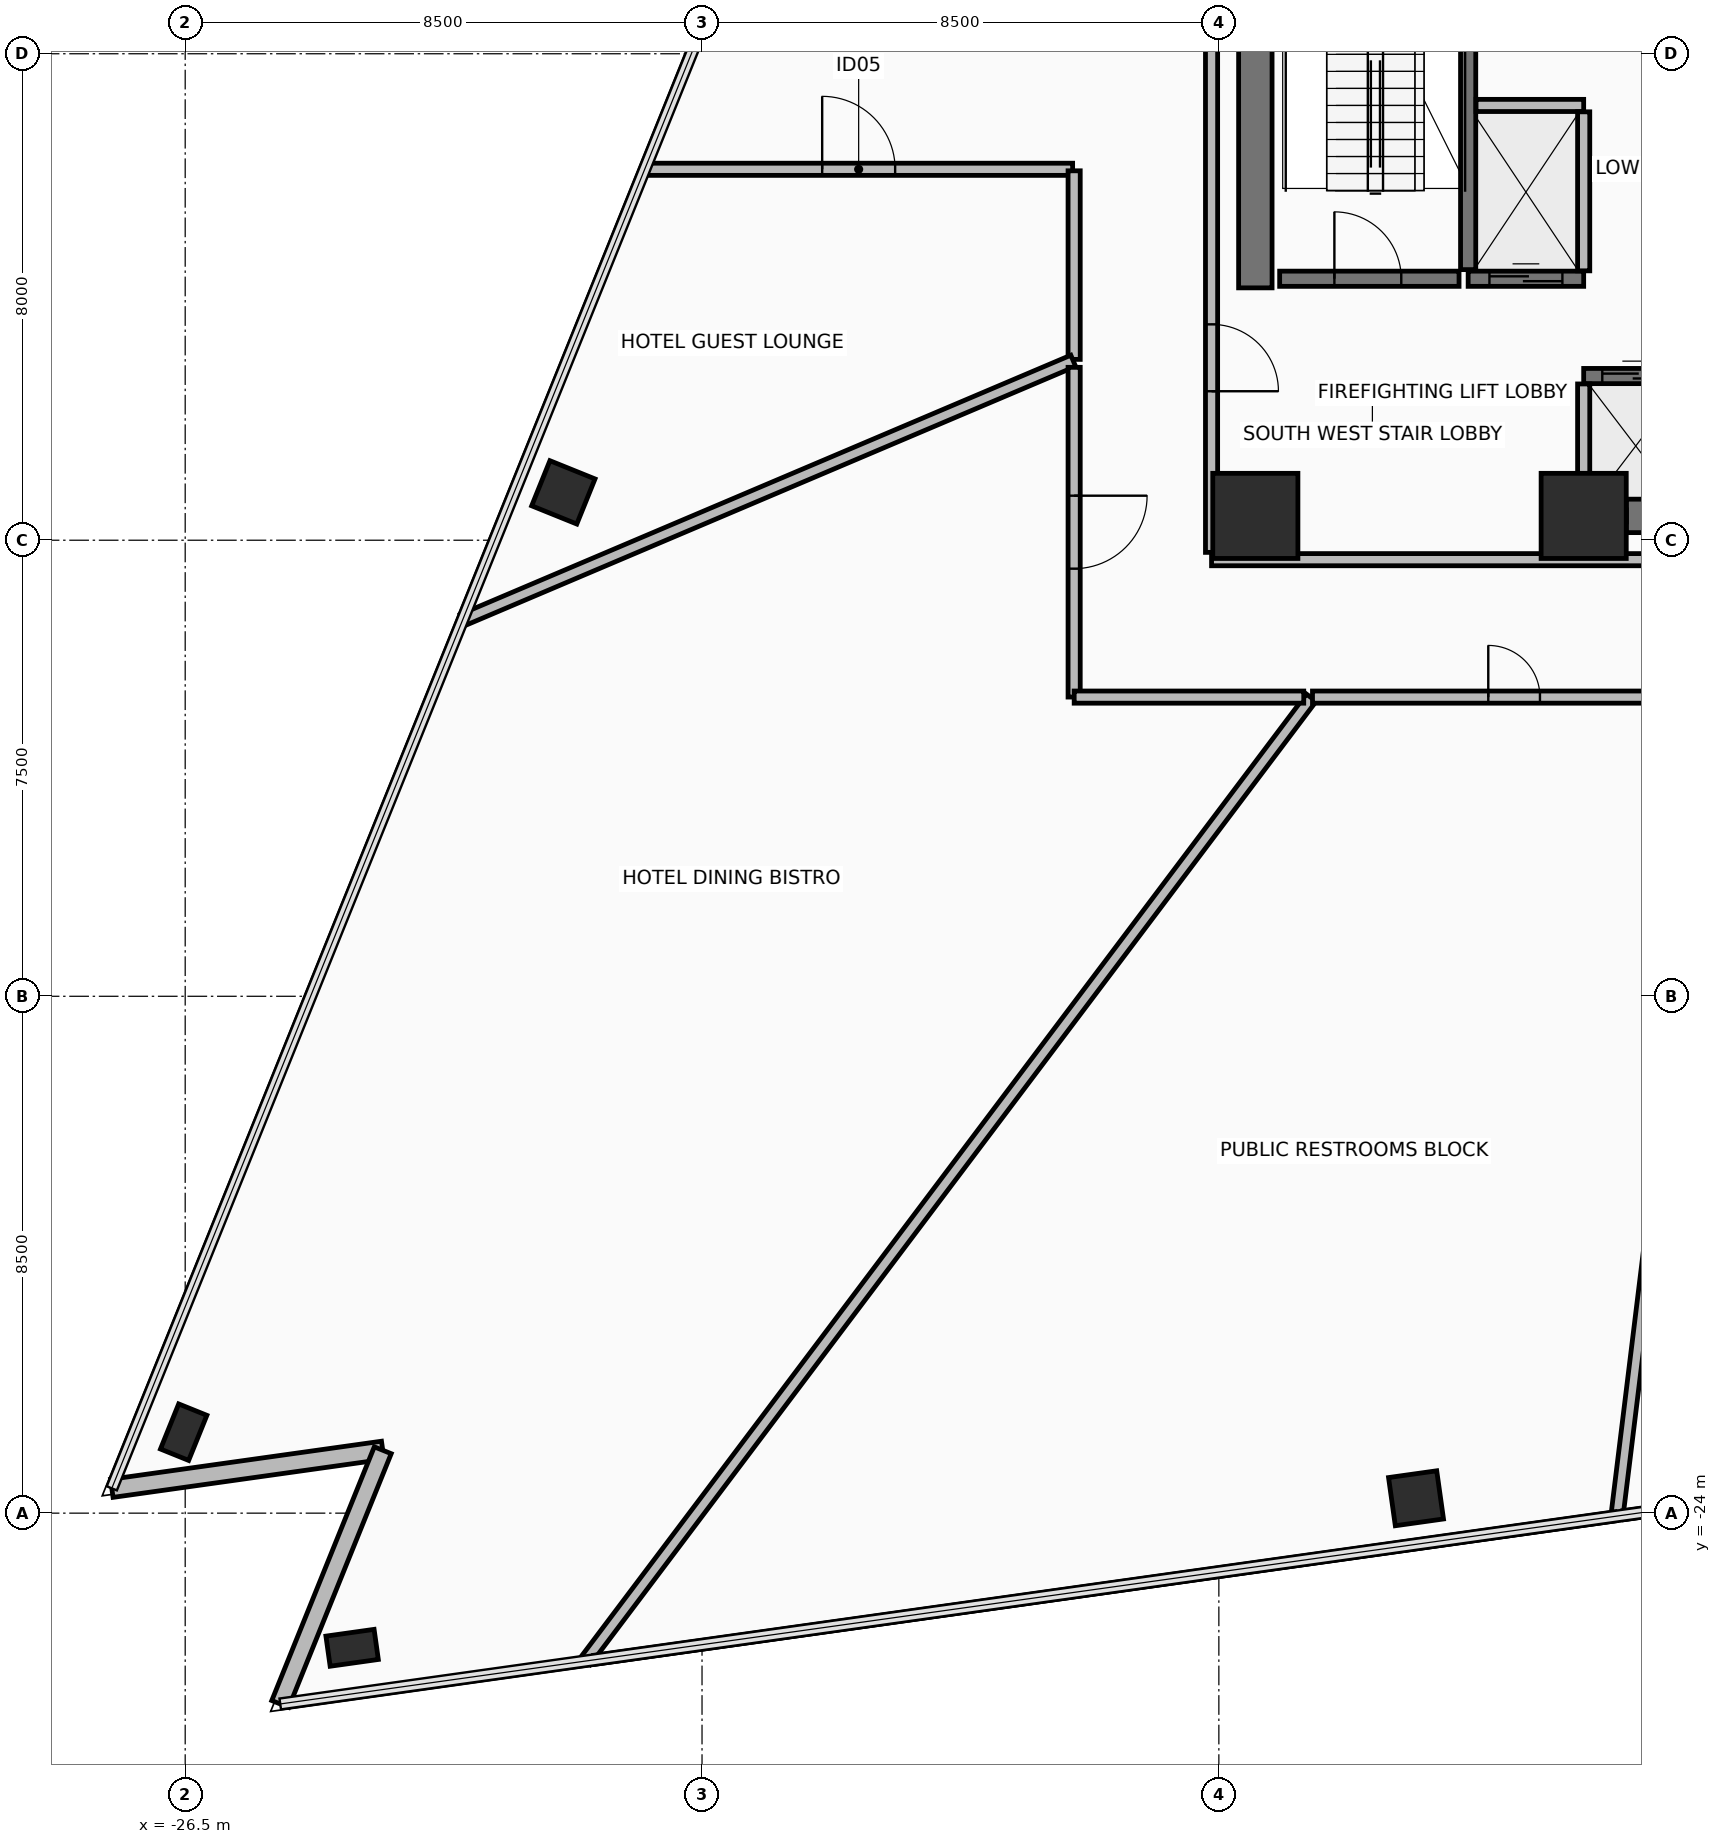
"""IFC4 building model, lengths in metres.
Left out: names, types, materials, properties, quantities, classifications, styles, units other than length and angle.
Written with IfcOpenShell. Run it as: python <this file> out.ifc"""

import sys

from ifc_helpers import new_model, si_unit, direction, frame, frame_2d, origin, origin_2d, place, context, subcontext, project, spatial, rectangle, hollow_rectangle, extrude, element, fill, save


model = new_model("IFC4")
c1 = context("Model", 3, precision=1e-05, world=origin(), true_north=direction((0.0, 1.0)))
c2 = subcontext(c1, "Body", "Model", "MODEL_VIEW")
j1 = project(units=[si_unit("LENGTHUNIT", "METRE"), si_unit("PLANEANGLEUNIT", "RADIAN")], contexts=[c1])
p1 = place(None, origin())
s1 = spatial("IfcSite", under=j1, at=p1, CompositionType="ELEMENT")
p2 = place(p1, origin())
s2 = spatial("IfcBuilding", under=s1, at=p2, CompositionType="ELEMENT")
p3 = place(p2, frame((0.0, 0.0, 74.2)))
s3 = spatial("IfcBuildingStorey", under=s2, at=p3, CompositionType="ELEMENT", Elevation=74.2)
for number, where, z_axis, x_axis in (
    (1, (-8.9, -7.6, 0.0), (0.0, 0.0, 1.0), (1.0, 0.0, 0.0)),
    (2, (-3.5, -7.6, 0.0), (0.0, 0.0, 1.0), (1.0, 0.0, 0.0)),
):
    element("IfcColumn", number, at=place(p3, frame(where, z_axis=z_axis, x_axis=x_axis)), inside=s3, PredefinedType="COLUMN", context=c2, shape_type="SweptSolid", body=[
        extrude(rectangle(XDim=1.4, YDim=1.4, at=origin_2d()), origin(), (0.0, 0.0, 1.0), 3.45),
    ])
p4 = place(p3, frame((-20.281, -7.213, 0.0), z_axis=(0.0, 0.0, 1.0), x_axis=(0.374608211656, 0.927183200754, 0.0)))
e3 = element("IfcColumn", 3, at=p4, inside=s3, PredefinedType="COLUMN", context=c2, shape_type="SweptSolid", body=[
    extrude(hollow_rectangle(XDim=0.8, YDim=0.8, WallThickness=0.045, at=origin_2d()), origin(), (0.0, 0.0, 1.0), 3.45),
])
for number, where, z_axis, x_axis in (
    (4, (-26.525, -22.668, 0.0), (0.0, 0.0, 1.0), (0.375, 0.927, 0.0)),
    (5, (-23.755, -26.214, 0.0), (0.0, 0.0, 1.0), (0.99, 0.139, 0.0)),
):
    element("IfcColumn", number, at=place(p3, frame(where, z_axis=z_axis, x_axis=x_axis)), inside=s3, PredefinedType="COLUMN", context=c2, shape_type="SweptSolid", body=[
        extrude(hollow_rectangle(XDim=0.5, YDim=0.8, WallThickness=0.04, at=origin_2d()), origin(), (0.0, 0.0, 1.0), 3.45),
    ])
p5 = place(p3, frame((-6.257, -23.755, 0.0), z_axis=(0.0, 0.0, 1.0), x_axis=(0.990268068742, 0.13917310096, 0.0)))
e6 = element("IfcColumn", 6, at=p5, inside=s3, PredefinedType="COLUMN", context=c2, shape_type="SweptSolid", body=[
    extrude(hollow_rectangle(XDim=0.8, YDim=0.8, WallThickness=0.045, at=origin_2d()), origin(), (0.0, 0.0, 1.0), 3.45),
])
p6 = place(p3, frame((-27.707, -23.592, 0.0), z_axis=(0.0, 0.0, 1.0), x_axis=(0.990269200152, 0.139165050317, 0.0)))
e7 = element("IfcWall", 7, at=p6, inside=s3, PredefinedType="STANDARD", context=c2, shape_type="SweptSolid", body=[
    extrude(rectangle(XDim=4.5, YDim=0.3, at=frame_2d((2.25, 0.0))), origin(), (0.0, 0.0, 1.0), 2.47),
])
p7 = place(p3, frame((-23.251, -22.966, 0.0), z_axis=(0.0, 0.0, 1.0), x_axis=(-0.374568898324, -0.927199083481, 0.0)))
e8 = element("IfcWall", 8, at=p7, inside=s3, PredefinedType="STANDARD", context=c2, shape_type="SweptSolid", body=[
    extrude(rectangle(XDim=4.5, YDim=0.3, at=frame_2d((2.25, 0.0))), origin(), (0.0, 0.0, 1.0), 2.47),
])
p8 = place(p3, frame((-2.8, -7.6, 0.0), z_axis=(0.0, 0.0, 1.0), x_axis=(1.0, 0.0, 0.0)))
e9 = element("IfcWall", 9, at=p8, inside=s3, PredefinedType="SHEAR", context=c2, shape_type="SweptSolid", body=[
    extrude(rectangle(XDim=5.38, YDim=0.55, at=frame_2d((2.69, 0.0))), origin(), (0.0, 0.0, 1.0), 3.275),
])
p9 = place(p3, frame((-8.9, -3.85, 0.0), z_axis=(0.0, 0.0, 1.0), x_axis=(0.0, 1.0, 0.0)))
e10 = element("IfcWall", 10, at=p9, inside=s3, PredefinedType="SHEAR", context=c2, shape_type="SweptSolid", body=[
    extrude(rectangle(XDim=10.7, YDim=0.55, at=frame_2d((5.35, 0.0))), origin(), (0.0, 0.0, 1.0), 3.275),
])
p10 = place(p3, frame((-9.62, -8.32, 0.0), z_axis=(0.0, 0.0, 1.0), x_axis=(1.0, 0.0, 0.0)))
e11 = element("IfcWall", 11, at=p10, inside=s3, PredefinedType="PARTITIONING", context=c2, shape_type="SweptSolid", body=[
    extrude(rectangle(XDim=19.24, YDim=0.2, at=frame_2d((9.62, 0.0))), origin(), (0.0, 0.0, 1.0), 2.67),
])
p11 = place(p3, frame((-9.62, 8.2, 0.0), z_axis=(0.0, 0.0, 1.0), x_axis=(0.0, -1.0, 0.0)))
e12 = element("IfcWall", 12, at=p11, inside=s3, PredefinedType="PARTITIONING", context=c2, shape_type="SweptSolid", body=[
    extrude(rectangle(XDim=16.4, YDim=0.2, at=frame_2d((8.2, 0.0))), origin(), (0.0, 0.0, 1.0), 2.67),
])
p12 = place(p11, frame((12.65, 0.0, 0.0)))
e13 = element("IfcOpeningElement", 13, at=p12, cuts=e12, PredefinedType="OPENING", context=c2, shape_type="SweptSolid", body=[
    extrude(rectangle(XDim=1.1, YDim=2.15, at=frame_2d((0.55, 1.075))), frame((0.0, 0.11, 0.0), z_axis=(0.0, -1.0, 0.0), x_axis=(1.0, 0.0, 0.0)), (0.0, 0.0, 1.0), 0.22),
])
p13 = place(p3, frame((-5.4, -3.55, 0.0), z_axis=(0.0, 0.0, 1.0), x_axis=(0.0, 1.0, 0.0)))
e14 = element("IfcWall", 14, at=p13, inside=s3, PredefinedType="SHEAR", context=c2, shape_type="SweptSolid", body=[
    extrude(rectangle(XDim=7.3, YDim=0.25, at=frame_2d((3.65, 0.0))), origin(), (0.0, 0.0, 1.0), 3.275),
])
p14 = place(p3, frame((-8.5, -3.7, 0.0), z_axis=(0.0, 0.0, 1.0), x_axis=(1.0, 0.0, 0.0)))
e15 = element("IfcWall", 15, at=p14, inside=s3, PredefinedType="SHEAR", context=c2, shape_type="SweptSolid", body=[
    extrude(rectangle(XDim=2.95, YDim=0.25, at=frame_2d((1.475, 0.0))), origin(), (0.0, 0.0, 1.0), 3.275),
])
p15 = place(p14, frame((0.9, 0.0, 0.0)))
e16 = element("IfcOpeningElement", 16, at=p15, cuts=e15, PredefinedType="OPENING", context=c2, shape_type="SweptSolid", body=[
    extrude(rectangle(XDim=1.1, YDim=2.15, at=frame_2d((0.55, 1.075))), frame((0.0, 0.135, 0.0), z_axis=(0.0, -1.0, 0.0), x_axis=(1.0, 0.0, 0.0)), (0.0, 0.0, 1.0), 0.27),
])
p16 = place(p3, frame((-3.5, -5.3, 0.0), z_axis=(0.0, 0.0, 1.0), x_axis=(1.0, 0.0, 0.0)))
e17 = element("IfcWall", 17, at=p16, inside=s3, PredefinedType="SHEAR", context=c2, shape_type="SweptSolid", body=[
    extrude(rectangle(XDim=1.712, YDim=0.25, at=frame_2d((0.856, 0.0))), origin(), (0.0, 0.0, 1.0), 3.275),
])
p17 = place(p16, frame((0.306, 0.0, 0.0)))
e18 = element("IfcOpeningElement", 18, at=p17, cuts=e17, PredefinedType="OPENING", context=c2, shape_type="SweptSolid", body=[
    extrude(rectangle(XDim=1.1, YDim=2.2, at=frame_2d((0.55, 1.1))), frame((0.0, 0.135, 0.0), z_axis=(0.0, -1.0, 0.0), x_axis=(1.0, 0.0, 0.0)), (0.0, 0.0, 1.0), 0.27),
])
p18 = place(p3, frame((-3.5, -7.6, 0.0), z_axis=(0.0, 0.0, 1.0), x_axis=(1.0, 0.0, 0.0)))
e19 = element("IfcWall", 19, at=p18, inside=s3, PredefinedType="PARTITIONING", context=c2, shape_type="SweptSolid", body=[
    extrude(rectangle(XDim=0.7, YDim=0.2, at=frame_2d((0.35, 0.0))), origin(), (0.0, 0.0, 1.0), 2.47),
])
p19 = place(p3, frame((-3.5, -7.495, 0.0), z_axis=(0.0, 0.0, 1.0), x_axis=(0.0, 1.0, 0.0)))
e20 = element("IfcWall", 20, at=p19, inside=s3, PredefinedType="PARTITIONING", context=c2, shape_type="SweptSolid", body=[
    extrude(rectangle(XDim=2.065, YDim=0.2, at=frame_2d((1.033, 0.0))), origin(), (0.0, 0.0, 1.0), 2.47),
])
p20 = place(p3, frame((-5.4, -3.7, 0.0), z_axis=(0.0, 0.0, 1.0), x_axis=(1.0, 0.0, 0.0)))
e21 = element("IfcWall", 21, at=p20, inside=s3, PredefinedType="SHEAR", context=c2, shape_type="SweptSolid", body=[
    extrude(rectangle(XDim=1.9, YDim=0.25, at=frame_2d((0.95, 0.0))), origin(), (0.0, 0.0, 1.0), 3.275),
])
p21 = place(p20, frame((0.35, 0.0, 0.0)))
e22 = element("IfcOpeningElement", 22, at=p21, cuts=e21, PredefinedType="OPENING", context=c2, shape_type="SweptSolid", body=[
    extrude(rectangle(XDim=1.2, YDim=2.2, at=frame_2d((0.6, 1.1))), frame((0.0, 0.135, 0.0), z_axis=(0.0, -1.0, 0.0), x_axis=(1.0, 0.0, 0.0)), (0.0, 0.0, 1.0), 0.27),
])
p22 = place(p3, frame((-5.27, -0.85, 0.0), z_axis=(0.0, 0.0, 1.0), x_axis=(1.0, 0.0, 0.0)))
e23 = element("IfcWall", 23, at=p22, inside=s3, PredefinedType="PARTITIONING", context=c2, shape_type="SweptSolid", body=[
    extrude(rectangle(XDim=1.77, YDim=0.2, at=frame_2d((0.885, 0.0))), origin(), (0.0, 0.0, 1.0), 3.275),
])
p23 = place(p3, frame((-3.5, -3.57, 0.0), z_axis=(0.0, 0.0, 1.0), x_axis=(0.0, 1.0, 0.0)))
e24 = element("IfcWall", 24, at=p23, inside=s3, PredefinedType="PARTITIONING", context=c2, shape_type="SweptSolid", body=[
    extrude(rectangle(XDim=2.615, YDim=0.2, at=frame_2d((1.308, 0.0))), origin(), (0.0, 0.0, 1.0), 3.275),
])
p24 = place(p3, frame((-19.918, -26.433, 0.0), z_axis=(0.0, 0.0, 1.0), x_axis=(0.601823847332, 0.798628860475, 0.0)))
e25 = element("IfcWall", 25, at=p24, inside=s3, PredefinedType="PARTITIONING", context=c2, shape_type="SweptSolid", body=[
    extrude(rectangle(XDim=19.837, YDim=0.2, at=frame_2d((9.918, 0.0))), origin(), (0.0, 0.0, 1.0), 2.47),
])
p25 = place(p3, frame((-7.96, -10.58, 0.0), z_axis=(0.0, 0.0, 1.0), x_axis=(1.0, 0.0, 0.0)))
e26 = element("IfcWall", 26, at=p25, inside=s3, PredefinedType="PARTITIONING", context=c2, shape_type="SweptSolid", body=[
    extrude(rectangle(XDim=6.633, YDim=0.2, at=frame_2d((3.316, 0.0))), origin(), (0.0, 0.0, 1.0), 3.275),
])
p26 = place(p25, frame((2.891, 0.0, 0.0)))
e27 = element("IfcOpeningElement", 27, at=p26, cuts=e26, PredefinedType="OPENING", context=c2, shape_type="SweptSolid", body=[
    extrude(rectangle(XDim=0.85, YDim=2.1, at=frame_2d((0.425, 1.05))), frame((0.0, 0.11, 0.0), z_axis=(0.0, -1.0, 0.0), x_axis=(1.0, 0.0, 0.0)), (0.0, 0.0, 1.0), 0.22),
])
p27 = place(p3, frame((-1.302, -10.608, 0.0), z_axis=(0.0, 0.0, 1.0), x_axis=(-0.121870082422, -0.992546060901, 0.0)))
e28 = element("IfcWall", 28, at=p27, inside=s3, PredefinedType="PARTITIONING", context=c2, shape_type="SweptSolid", body=[
    extrude(rectangle(XDim=13.522, YDim=0.2, at=frame_2d((6.761, 0.0))), origin(), (0.0, 0.0, 1.0), 2.47),
])
p28 = place(p3, frame((-2.972, -24.051, 0.0), z_axis=(0.0, 0.0, 1.0), x_axis=(-0.99026786231, -0.13917456979, 0.0)))
e29 = element("IfcWall", 29, at=p28, inside=s3, PredefinedType="PARTITIONING", context=c2, shape_type="SweptSolid", body=[
    extrude(rectangle(XDim=16.965, YDim=0.15, at=frame_2d((8.482, 0.0))), origin(), (0.0, 0.0, 1.0), 3.275),
])
p29 = place(p3, frame((9.359, -22.318, 0.0), z_axis=(0.0, 0.0, 1.0), x_axis=(-0.990266692115, -0.139182895813, 0.0)))
e30 = element("IfcWall", 30, at=p29, inside=s3, PredefinedType="PARTITIONING", context=c2, shape_type="SweptSolid", body=[
    extrude(rectangle(XDim=12.324, YDim=0.15, at=frame_2d((6.162, 0.0))), origin(), (0.0, 0.0, 1.0), 3.275),
])
p30 = place(p3, frame((-18.943, -1.9, 0.0), z_axis=(0.0, 0.0, 1.0), x_axis=(1.0, 0.0, 0.0)))
e31 = element("IfcWall", 31, at=p30, inside=s3, PredefinedType="PARTITIONING", context=c2, shape_type="SweptSolid", body=[
    extrude(rectangle(XDim=7.038, YDim=0.2, at=frame_2d((3.519, 0.0))), origin(), (0.0, 0.0, 1.0), 2.47),
])
p31 = place(p30, frame((2.919, 0.0, 0.0)))
e32 = element("IfcOpeningElement", 32, at=p31, cuts=e31, PredefinedType="OPENING", context=c2, shape_type="SweptSolid", body=[
    extrude(rectangle(XDim=1.2, YDim=2.15, at=frame_2d((0.6, 1.075))), frame((0.0, 0.11, 0.0), z_axis=(0.0, -1.0, 0.0), x_axis=(1.0, 0.0, 0.0)), (0.0, 0.0, 1.0), 0.22),
])
p32 = place(p3, frame((-11.88, -1.925, 0.0), z_axis=(0.0, 0.0, 1.0), x_axis=(0.0, -1.0, 0.0)))
e33 = element("IfcWall", 33, at=p32, inside=s3, PredefinedType="PARTITIONING", context=c2, shape_type="SweptSolid", body=[
    extrude(rectangle(XDim=3.101, YDim=0.2, at=frame_2d((1.551, 0.0))), origin(), (0.0, 0.0, 1.0), 3.275),
])
p33 = place(p3, frame((-11.895, -5.049, 0.0), z_axis=(0.0, 0.0, 1.0), x_axis=(-0.920504230584, -0.390732595872, 0.0)))
e34 = element("IfcWall", 34, at=p33, inside=s3, PredefinedType="PARTITIONING", context=c2, shape_type="SweptSolid", body=[
    extrude(rectangle(XDim=10.909, YDim=0.2, at=frame_2d((5.455, 0.0))), origin(), (0.0, 0.0, 1.0), 2.47),
])
p34 = place(p3, frame((-11.88, -5.157, 0.0), z_axis=(0.0, 0.0, 1.0), x_axis=(0.0, -1.0, 0.0)))
e35 = element("IfcWall", 35, at=p34, inside=s3, PredefinedType="PARTITIONING", context=c2, shape_type="SweptSolid", body=[
    extrude(rectangle(XDim=5.423, YDim=0.2, at=frame_2d((2.711, 0.0))), origin(), (0.0, 0.0, 1.0), 2.67),
])
p35 = place(p34, frame((2.111, 0.0, 0.0)))
e36 = element("IfcOpeningElement", 36, at=p35, cuts=e35, PredefinedType="OPENING", context=c2, shape_type="SweptSolid", body=[
    extrude(rectangle(XDim=1.2, YDim=2.15, at=frame_2d((0.6, 1.075))), frame((0.0, 0.11, 0.0), z_axis=(0.0, -1.0, 0.0), x_axis=(1.0, 0.0, 0.0)), (0.0, 0.0, 1.0), 0.22),
])
p36 = place(p3, frame((-11.879, -10.58, 0.0), z_axis=(0.0, 0.0, 1.0), x_axis=(1.0, 0.0, 0.0)))
e37 = element("IfcWall", 37, at=p36, inside=s3, PredefinedType="PARTITIONING", context=c2, shape_type="SweptSolid", body=[
    extrude(rectangle(XDim=3.775, YDim=0.2, at=frame_2d((1.888, 0.0))), origin(), (0.0, 0.0, 1.0), 2.67),
])
p37 = place(p12, frame((1.1, 0.0, 0.0), z_axis=(0.0, 0.0, 1.0), x_axis=(-1.0, 0.0, 0.0)))
e38 = element("IfcDoor", 38, at=p37, inside=s3, OperationType="SINGLE_SWING_LEFT", PredefinedType="DOOR", context=c2, shape_type="SweptSolid", body=[
    extrude(rectangle(XDim=1.1, YDim=2.15, at=frame_2d((0.55, 1.075))), frame((0.0, 0.025, 0.0), z_axis=(0.0, -1.0, 0.0), x_axis=(1.0, 0.0, 0.0)), (0.0, 0.0, 1.0), 0.05),
])
fill(e13, e38)
p38 = place(p15, origin())
e39 = element("IfcDoor", 39, at=p38, inside=s3, OperationType="SINGLE_SWING_LEFT", PredefinedType="DOOR", context=c2, shape_type="SweptSolid", body=[
    extrude(rectangle(XDim=1.1, YDim=2.15, at=frame_2d((0.55, 1.075))), frame((0.0, 0.025, 0.0), z_axis=(0.0, -1.0, 0.0), x_axis=(1.0, 0.0, 0.0)), (0.0, 0.0, 1.0), 0.05),
])
fill(e16, e39)
p39 = place(p17, origin())
e40 = element("IfcDoor", 40, at=p39, inside=s3, OperationType="SLIDING_TO_LEFT", PredefinedType="DOOR", context=c2, shape_type="SweptSolid", body=[
    extrude(rectangle(XDim=1.1, YDim=2.2, at=frame_2d((0.55, 1.1))), frame((0.0, 0.025, 0.0), z_axis=(0.0, -1.0, 0.0), x_axis=(1.0, 0.0, 0.0)), (0.0, 0.0, 1.0), 0.05),
])
fill(e18, e40)
p40 = place(p21, origin())
e41 = element("IfcDoor", 41, at=p40, inside=s3, OperationType="SLIDING_TO_RIGHT", PredefinedType="DOOR", context=c2, shape_type="SweptSolid", body=[
    extrude(rectangle(XDim=1.2, YDim=2.2, at=frame_2d((0.6, 1.1))), frame((0.0, 0.025, 0.0), z_axis=(0.0, -1.0, 0.0), x_axis=(1.0, 0.0, 0.0)), (0.0, 0.0, 1.0), 0.05),
])
fill(e22, e41)
p41 = place(p26, origin())
e42 = element("IfcDoor", 42, at=p41, inside=s3, OperationType="SINGLE_SWING_RIGHT", PredefinedType="DOOR", context=c2, shape_type="SweptSolid", body=[
    extrude(rectangle(XDim=0.85, YDim=2.1, at=frame_2d((0.425, 1.05))), frame((0.0, 0.025, 0.0), z_axis=(0.0, -1.0, 0.0), x_axis=(1.0, 0.0, 0.0)), (0.0, 0.0, 1.0), 0.05),
])
fill(e27, e42)
p42 = place(p31, origin())
e43 = element("IfcDoor", 43, at=p42, inside=s3, OperationType="SINGLE_SWING_LEFT", PredefinedType="DOOR", context=c2, shape_type="SweptSolid", body=[
    extrude(rectangle(XDim=1.2, YDim=2.15, at=frame_2d((0.6, 1.075))), frame((0.0, 0.025, 0.0), z_axis=(0.0, -1.0, 0.0), x_axis=(1.0, 0.0, 0.0)), (0.0, 0.0, 1.0), 0.05),
])
fill(e32, e43)
p43 = place(p35, origin())
e44 = element("IfcDoor", 44, at=p43, inside=s3, OperationType="SINGLE_SWING_LEFT", PredefinedType="DOOR", context=c2, shape_type="SweptSolid", body=[
    extrude(rectangle(XDim=1.2, YDim=2.15, at=frame_2d((0.6, 1.075))), frame((0.0, 0.025, 0.0), z_axis=(0.0, -1.0, 0.0), x_axis=(1.0, 0.0, 0.0)), (0.0, 0.0, 1.0), 0.05),
])
fill(e36, e44)
save(model, sys.argv[1])
